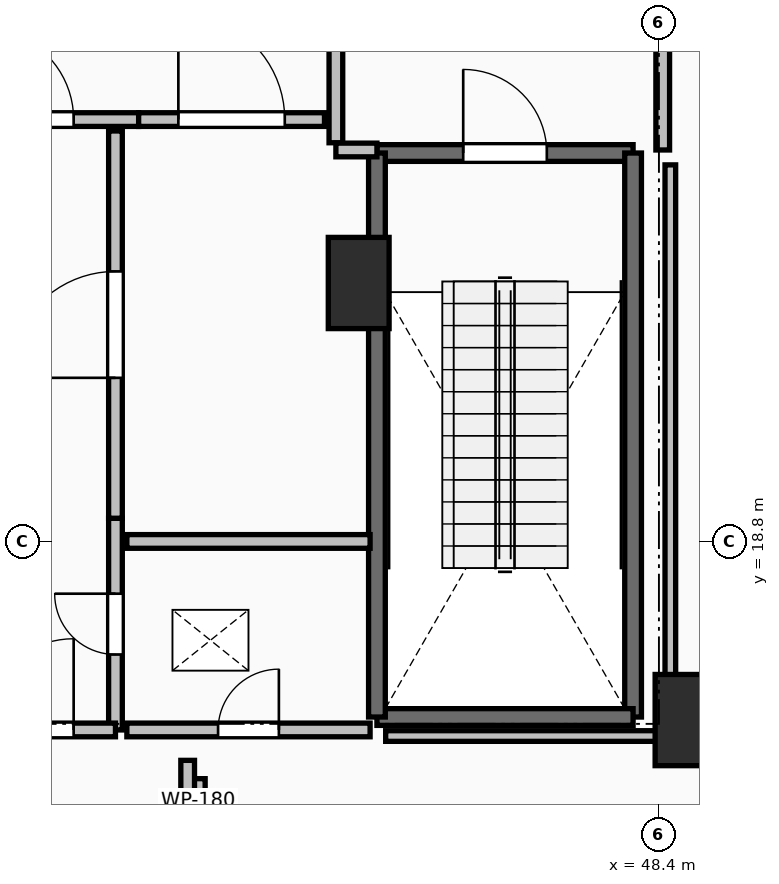
"""IFC4 building model, lengths in metres.
Left out: names, types, materials, properties, quantities, classifications, styles, units other than length and angle.
Written with IfcOpenShell. Run it as: python <this file> out.ifc"""

import sys

from ifc_helpers import new_model, si_unit, direction, frame, frame_2d, origin, origin_2d, place, context, subcontext, project, spatial, rectangle, extrude, element, fill, save


model = new_model("IFC4")
c1 = context("Model", 3, precision=1e-05, world=origin(), true_north=direction((0.0, 1.0)))
c2 = subcontext(c1, "Body", "Model", "MODEL_VIEW")
j1 = project(units=[si_unit("LENGTHUNIT", "METRE"), si_unit("PLANEANGLEUNIT", "RADIAN")], contexts=[c1])
p1 = place(None, origin())
s1 = spatial("IfcSite", under=j1, at=p1, CompositionType="ELEMENT")
p2 = place(p1, origin())
s2 = spatial("IfcBuilding", under=s1, at=p2, CompositionType="ELEMENT")
p3 = place(p2, frame((0.0, 0.0, 69.5)))
s3 = spatial("IfcBuildingStorey", under=s2, at=p3, CompositionType="ELEMENT", Elevation=69.5)
for number, where, z_axis, x_axis in (
    (1, (48.75, 16.45, 0.0), (0.0, 0.0, 1.0), (1.0, 0.0, 0.0)),
    (2, (44.45, 22.2, 0.0), (0.0, 0.0, 1.0), (1.0, 0.0, 0.0)),
):
    element("IfcColumn", number, at=place(p3, frame(where, z_axis=z_axis, x_axis=x_axis)), inside=s3, PredefinedType="PILASTER", context=c2, shape_type="SweptSolid", body=[
        extrude(rectangle(XDim=0.8, YDim=1.2, at=origin_2d()), origin(), (0.0, 0.0, 1.0), 4.8),
    ])
p4 = place(p3, frame((44.69, 23.91, 0.0), z_axis=(0.0, 0.0, 1.0), x_axis=(1.0, 0.0, 0.0)))
e3 = element("IfcWall", 3, at=p4, inside=s3, PredefinedType="SOLIDWALL", context=c2, shape_type="SweptSolid", body=[
    extrude(rectangle(XDim=3.37, YDim=0.22, at=frame_2d((1.685, 0.0))), origin(), (0.0, 0.0, 1.0), 4.5),
])
p5 = place(p4, frame((1.135, 0.0, 0.0)))
e4 = element("IfcOpeningElement", 4, at=p5, cuts=e3, PredefinedType="OPENING", context=c2, shape_type="SweptSolid", body=[
    extrude(rectangle(XDim=1.1, YDim=2.15, at=frame_2d((0.55, 1.075))), frame((0.0, 0.125, 0.0), z_axis=(0.0, -1.0, 0.0), x_axis=(1.0, 0.0, 0.0)), (0.0, 0.0, 1.0), 0.25),
])
p6 = place(p3, frame((48.06, 23.91, 0.0), z_axis=(0.0, 0.0, 1.0), x_axis=(0.0, -1.0, 0.0)))
e5 = element("IfcWall", 5, at=p6, inside=s3, PredefinedType="SOLIDWALL", context=c2, shape_type="SweptSolid", body=[
    extrude(rectangle(XDim=7.42, YDim=0.22, at=frame_2d((3.71, 0.0))), origin(), (0.0, 0.0, 1.0), 4.5),
])
p7 = place(p3, frame((48.06, 16.49, 0.0), z_axis=(0.0, 0.0, 1.0), x_axis=(-1.0, 0.0, 0.0)))
e6 = element("IfcWall", 6, at=p7, inside=s3, PredefinedType="SOLIDWALL", context=c2, shape_type="SweptSolid", body=[
    extrude(rectangle(XDim=3.37, YDim=0.22, at=frame_2d((1.685, 0.0))), origin(), (0.0, 0.0, 1.0), 4.5),
])
p8 = place(p3, frame((44.69, 16.49, 0.0), z_axis=(0.0, 0.0, 1.0), x_axis=(0.0, 1.0, 0.0)))
e7 = element("IfcWall", 7, at=p8, inside=s3, PredefinedType="SOLIDWALL", context=c2, shape_type="SweptSolid", body=[
    extrude(rectangle(XDim=7.42, YDim=0.22, at=frame_2d((3.71, 0.0))), origin(), (0.0, 0.0, 1.0), 4.5),
])
p9 = place(p3, frame((44.15, 27.955, 0.0), z_axis=(0.0, 0.0, 1.0), x_axis=(0.0, -1.0, 0.0)))
e8 = element("IfcWall", 8, at=p9, inside=s3, PredefinedType="PARTITIONING", context=c2, shape_type="SweptSolid", body=[
    extrude(rectangle(XDim=3.91, YDim=0.18, at=frame_2d((1.955, 0.0))), origin(), (0.0, 0.0, 1.0), 4.5),
])
p10 = place(p9, frame((1.355, 0.0, 0.0)))
e9 = element("IfcOpeningElement", 9, at=p10, cuts=e8, PredefinedType="OPENING", context=c2, shape_type="SweptSolid", body=[
    extrude(rectangle(XDim=1.2, YDim=2.15, at=frame_2d((0.6, 1.075))), frame((0.0, 0.105, 0.0), z_axis=(0.0, -1.0, 0.0), x_axis=(1.0, 0.0, 0.0)), (0.0, 0.0, 1.0), 0.21),
])
p11 = place(p3, frame((44.15, 23.95, 0.0), z_axis=(0.0, 0.0, 1.0), x_axis=(1.0, 0.0, 0.0)))
e10 = element("IfcWall", 10, at=p11, inside=s3, PredefinedType="PARTITIONING", context=c2, shape_type="SweptSolid", body=[
    extrude(rectangle(XDim=0.54, YDim=0.18, at=frame_2d((0.27, 0.0))), origin(), (0.0, 0.0, 1.0), 4.5),
])
p12 = place(p3, frame((48.45, 23.95, 0.0), z_axis=(0.0, 0.0, 1.0), x_axis=(0.0, 1.0, 0.0)))
e11 = element("IfcWall", 11, at=p12, inside=s3, PredefinedType="PARTITIONING", context=c2, shape_type="SweptSolid", body=[
    extrude(rectangle(XDim=4.05, YDim=0.18, at=frame_2d((2.025, 0.0))), origin(), (0.0, 0.0, 1.0), 3.482),
])
p13 = place(p12, frame((1.425, 0.0, 0.0)))
e12 = element("IfcOpeningElement", 12, at=p13, cuts=e11, PredefinedType="OPENING", context=c2, shape_type="SweptSolid", body=[
    extrude(rectangle(XDim=1.2, YDim=2.15, at=frame_2d((0.6, 1.075))), frame((0.0, 0.105, 0.0), z_axis=(0.0, -1.0, 0.0), x_axis=(1.0, 0.0, 0.0)), (0.0, 0.0, 1.0), 0.21),
])
p14 = place(p3, frame((38.645, 24.35, 0.0), z_axis=(0.0, 0.0, 1.0), x_axis=(1.0, 0.0, 0.0)))
e13 = element("IfcWall", 13, at=p14, inside=s3, PredefinedType="PARTITIONING", context=c2, shape_type="SweptSolid", body=[
    extrude(rectangle(XDim=2.91, YDim=0.18, at=frame_2d((1.455, 0.0))), origin(), (0.0, 0.0, 1.0), 4.5),
])
p15 = place(p14, frame((0.855, 0.0, 0.0)))
e14 = element("IfcOpeningElement", 14, at=p15, cuts=e13, PredefinedType="OPENING", context=c2, shape_type="SweptSolid", body=[
    extrude(rectangle(XDim=1.2, YDim=2.15, at=frame_2d((0.6, 1.075))), frame((0.0, 0.105, 0.0), z_axis=(0.0, -1.0, 0.0), x_axis=(1.0, 0.0, 0.0)), (0.0, 0.0, 1.0), 0.21),
])
p16 = place(p3, frame((41.555, 24.35, 0.0), z_axis=(0.0, 0.0, 1.0), x_axis=(1.0, 0.0, 0.0)))
e15 = element("IfcWall", 15, at=p16, inside=s3, PredefinedType="PARTITIONING", context=c2, shape_type="SweptSolid", body=[
    extrude(rectangle(XDim=2.445, YDim=0.18, at=frame_2d((1.223, 0.0))), origin(), (0.0, 0.0, 1.0), 4.5),
])
p17 = place(p16, frame((0.522, 0.0, 0.0)))
e16 = element("IfcOpeningElement", 16, at=p17, cuts=e15, PredefinedType="OPENING", context=c2, shape_type="SweptSolid", body=[
    extrude(rectangle(XDim=1.4, YDim=2.2, at=frame_2d((0.7, 1.1))), frame((0.0, 0.105, 0.0), z_axis=(0.0, -1.0, 0.0), x_axis=(1.0, 0.0, 0.0)), (0.0, 0.0, 1.0), 0.21),
])
p18 = place(p3, frame((41.25, 16.32, 0.0), z_axis=(0.0, 0.0, 1.0), x_axis=(0.0, 1.0, 0.0)))
e17 = element("IfcWall", 17, at=p18, inside=s3, PredefinedType="PARTITIONING", context=c2, shape_type="SweptSolid", body=[
    extrude(rectangle(XDim=2.785, YDim=0.18, at=frame_2d((1.393, 0.0))), origin(), (0.0, 0.0, 1.0), 4.5),
])
p19 = place(p18, frame((0.992, 0.0, 0.0)))
e18 = element("IfcOpeningElement", 18, at=p19, cuts=e17, PredefinedType="OPENING", context=c2, shape_type="SweptSolid", body=[
    extrude(rectangle(XDim=0.8, YDim=2.05, at=frame_2d((0.4, 1.025))), frame((0.0, 0.105, 0.0), z_axis=(0.0, -1.0, 0.0), x_axis=(1.0, 0.0, 0.0)), (0.0, 0.0, 1.0), 0.21),
])
p20 = place(p3, frame((41.25, 19.105, 0.0), z_axis=(0.0, 0.0, 1.0), x_axis=(0.0, 1.0, 0.0)))
e19 = element("IfcWall", 19, at=p20, inside=s3, PredefinedType="PARTITIONING", context=c2, shape_type="SweptSolid", body=[
    extrude(rectangle(XDim=5.095, YDim=0.18, at=frame_2d((2.547, 0.0))), origin(), (0.0, 0.0, 1.0), 4.5),
])
p21 = place(p20, frame((1.847, 0.0, 0.0)))
e20 = element("IfcOpeningElement", 20, at=p21, cuts=e19, PredefinedType="OPENING", context=c2, shape_type="SweptSolid", body=[
    extrude(rectangle(XDim=1.4, YDim=2.2, at=frame_2d((0.7, 1.1))), frame((0.0, 0.105, 0.0), z_axis=(0.0, -1.0, 0.0), x_axis=(1.0, 0.0, 0.0)), (0.0, 0.0, 1.0), 0.21),
])
p22 = place(p3, frame((38.95, 16.32, 0.0), z_axis=(0.0, 0.0, 1.0), x_axis=(1.0, 0.0, 0.0)))
e21 = element("IfcWall", 21, at=p22, inside=s3, PredefinedType="PARTITIONING", context=c2, shape_type="SweptSolid", body=[
    extrude(rectangle(XDim=2.3, YDim=0.18, at=frame_2d((1.15, 0.0))), origin(), (0.0, 0.0, 1.0), 4.5),
])
p23 = place(p22, frame((0.55, 0.0, 0.0)))
e22 = element("IfcOpeningElement", 22, at=p23, cuts=e21, PredefinedType="OPENING", context=c2, shape_type="SweptSolid", body=[
    extrude(rectangle(XDim=1.2, YDim=2.15, at=frame_2d((0.6, 1.075))), frame((0.0, 0.105, 0.0), z_axis=(0.0, -1.0, 0.0), x_axis=(1.0, 0.0, 0.0)), (0.0, 0.0, 1.0), 0.21),
])
p24 = place(p3, frame((44.6, 18.8, 0.0), z_axis=(0.0, 0.0, 1.0), x_axis=(-1.0, 0.0, 0.0)))
e23 = element("IfcWall", 23, at=p24, inside=s3, PredefinedType="PARTITIONING", context=c2, shape_type="SweptSolid", body=[
    extrude(rectangle(XDim=3.2, YDim=0.18, at=frame_2d((1.6, 0.0))), origin(), (0.0, 0.0, 1.0), 4.5),
])
p25 = place(p3, frame((41.4, 16.32, 0.0), z_axis=(0.0, 0.0, 1.0), x_axis=(1.0, 0.0, 0.0)))
e24 = element("IfcWall", 24, at=p25, inside=s3, PredefinedType="PARTITIONING", context=c2, shape_type="SweptSolid", body=[
    extrude(rectangle(XDim=3.2, YDim=0.18, at=frame_2d((1.6, 0.0))), origin(), (0.0, 0.0, 1.0), 4.5),
])
p26 = place(p25, frame((1.2, 0.0, 0.0)))
e25 = element("IfcOpeningElement", 25, at=p26, cuts=e24, PredefinedType="OPENING", context=c2, shape_type="SweptSolid", body=[
    extrude(rectangle(XDim=0.8, YDim=2.05, at=frame_2d((0.4, 1.025))), frame((0.0, 0.105, 0.0), z_axis=(0.0, -1.0, 0.0), x_axis=(1.0, 0.0, 0.0)), (0.0, 0.0, 1.0), 0.21),
])
p27 = place(p3, frame((42.34, 15.679, 0.0), z_axis=(0.0, 0.0, 1.0), x_axis=(0.0, -1.0, 0.0)))
e26 = element("IfcWall", 26, at=p27, inside=s3, PredefinedType="PARTITIONING", context=c2, shape_type="SweptSolid", body=[
    extrude(rectangle(XDim=1.579, YDim=0.18, at=frame_2d((0.79, 0.0))), origin(), (0.0, 0.0, 1.0), 4.5),
])
p28 = place(p3, frame((42.2, 14.1, 0.0), z_axis=(0.0, 0.0, 1.0), x_axis=(0.0, 1.0, 0.0)))
e27 = element("IfcWall", 27, at=p28, inside=s3, PredefinedType="PARTITIONING", context=c2, shape_type="SweptSolid", body=[
    extrude(rectangle(XDim=1.82, YDim=0.18, at=frame_2d((0.91, 0.0))), origin(), (0.0, 0.0, 1.0), 4.5),
])
p29 = place(p3, frame((48.55, 23.754, 0.0), z_axis=(0.0, 0.0, 1.0), x_axis=(0.0, -1.0, 0.0)))
e28 = element("IfcWall", 28, at=p29, inside=s3, PredefinedType="PARTITIONING", context=c2, shape_type="SweptSolid", body=[
    extrude(rectangle(XDim=7.514, YDim=0.14, at=frame_2d((3.757, 0.0))), origin(), (0.0, 0.0, 1.0), 3.482),
])
p30 = place(p3, frame((48.55, 16.24, 0.0), z_axis=(0.0, 0.0, 1.0), x_axis=(-1.0, 0.0, 0.0)))
e29 = element("IfcWall", 29, at=p30, inside=s3, PredefinedType="PARTITIONING", context=c2, shape_type="SweptSolid", body=[
    extrude(rectangle(XDim=3.745, YDim=0.14, at=frame_2d((1.873, 0.0))), origin(), (0.0, 0.0, 1.0), 3.482),
])
p31 = place(p5, origin())
e30 = element("IfcDoor", 30, at=p31, inside=s3, OperationType="SINGLE_SWING_LEFT", PredefinedType="DOOR", context=c2, shape_type="SweptSolid", body=[
    extrude(rectangle(XDim=1.1, YDim=2.15, at=frame_2d((0.55, 1.075))), frame((0.0, 0.025, 0.0), z_axis=(0.0, -1.0, 0.0), x_axis=(1.0, 0.0, 0.0)), (0.0, 0.0, 1.0), 0.05),
])
fill(e4, e30)
p32 = place(p15, origin())
e31 = element("IfcDoor", 31, at=p32, inside=s3, OperationType="SINGLE_SWING_LEFT", PredefinedType="DOOR", context=c2, shape_type="SweptSolid", body=[
    extrude(rectangle(XDim=1.2, YDim=2.15, at=frame_2d((0.6, 1.075))), frame((0.0, 0.025, 0.0), z_axis=(0.0, -1.0, 0.0), x_axis=(1.0, 0.0, 0.0)), (0.0, 0.0, 1.0), 0.05),
])
fill(e14, e31)
p33 = place(p17, origin())
e32 = element("IfcDoor", 32, at=p33, inside=s3, OperationType="DOUBLE_SWING_LEFT", PredefinedType="DOOR", context=c2, shape_type="SweptSolid", body=[
    extrude(rectangle(XDim=1.4, YDim=2.2, at=frame_2d((0.7, 1.1))), frame((0.0, 0.025, 0.0), z_axis=(0.0, -1.0, 0.0), x_axis=(1.0, 0.0, 0.0)), (0.0, 0.0, 1.0), 0.05),
])
fill(e16, e32)
p34 = place(p19, origin())
e33 = element("IfcDoor", 33, at=p34, inside=s3, OperationType="SINGLE_SWING_RIGHT", PredefinedType="DOOR", context=c2, shape_type="SweptSolid", body=[
    extrude(rectangle(XDim=0.8, YDim=2.05, at=frame_2d((0.4, 1.025))), frame((0.0, 0.025, 0.0), z_axis=(0.0, -1.0, 0.0), x_axis=(1.0, 0.0, 0.0)), (0.0, 0.0, 1.0), 0.05),
])
fill(e18, e33)
p35 = place(p21, origin())
e34 = element("IfcDoor", 34, at=p35, inside=s3, OperationType="DOUBLE_SWING_LEFT", PredefinedType="DOOR", context=c2, shape_type="SweptSolid", body=[
    extrude(rectangle(XDim=1.4, YDim=2.2, at=frame_2d((0.7, 1.1))), frame((0.0, 0.025, 0.0), z_axis=(0.0, -1.0, 0.0), x_axis=(1.0, 0.0, 0.0)), (0.0, 0.0, 1.0), 0.05),
])
fill(e20, e34)
p36 = place(p23, origin())
e35 = element("IfcDoor", 35, at=p36, inside=s3, OperationType="SINGLE_SWING_RIGHT", PredefinedType="DOOR", context=c2, shape_type="SweptSolid", body=[
    extrude(rectangle(XDim=1.2, YDim=2.15, at=frame_2d((0.6, 1.075))), frame((0.0, 0.025, 0.0), z_axis=(0.0, -1.0, 0.0), x_axis=(1.0, 0.0, 0.0)), (0.0, 0.0, 1.0), 0.05),
])
fill(e22, e35)
p37 = place(p26, origin())
e36 = element("IfcDoor", 36, at=p37, inside=s3, OperationType="SINGLE_SWING_RIGHT", PredefinedType="DOOR", context=c2, shape_type="SweptSolid", body=[
    extrude(rectangle(XDim=0.8, YDim=2.05, at=frame_2d((0.4, 1.025))), frame((0.0, 0.025, 0.0), z_axis=(0.0, -1.0, 0.0), x_axis=(1.0, 0.0, 0.0)), (0.0, 0.0, 1.0), 0.05),
])
fill(e25, e36)
save(model, sys.argv[1])
